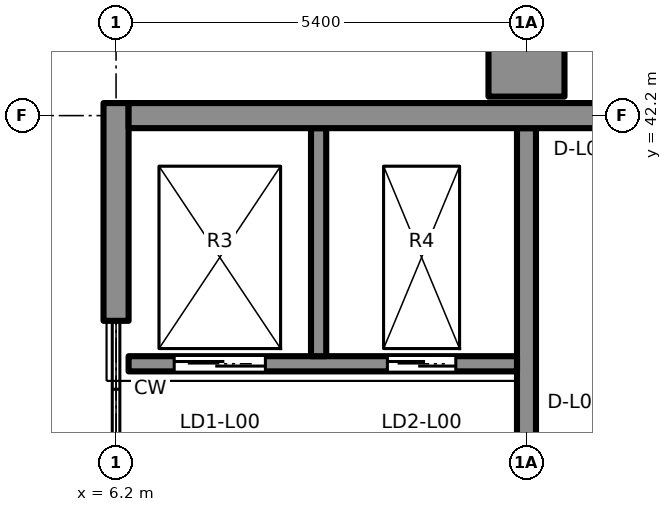
"""IFC4 building model, lengths in metres.
Left out: names, types, materials, properties, quantities, classifications, styles, units other than length and angle.
Written with IfcOpenShell. Run it as: python <this file> out.ifc"""

import sys

from ifc_helpers import new_model, si_unit, direction, frame, frame_2d, origin, place, context, subcontext, project, spatial, rectangle, extrude, element, fill, save


model = new_model("IFC4")
c1 = context("Model", 3, precision=1e-05, world=origin(), true_north=direction((0.0, 1.0)))
c2 = subcontext(c1, "Body", "Model", "MODEL_VIEW")
j1 = project(units=[si_unit("LENGTHUNIT", "METRE"), si_unit("PLANEANGLEUNIT", "RADIAN")], contexts=[c1])
p1 = place(None, origin())
s1 = spatial("IfcSite", under=j1, at=p1, CompositionType="ELEMENT")
p2 = place(p1, origin())
s2 = spatial("IfcBuilding", under=s1, at=p2, CompositionType="ELEMENT")
p3 = place(p2, origin())
s3 = spatial("IfcBuildingStorey", under=s2, at=p3, CompositionType="ELEMENT", Elevation=0.0)
p4 = place(p3, frame((11.6, 35.25, -1.4), z_axis=(0.0, 0.0, 1.0), x_axis=(0.0, 1.0, 0.0)))
e1 = element("IfcWall", 1, at=p4, inside=s3, PredefinedType="SHEAR", context=c2, shape_type="SweptSolid", body=[
    extrude(rectangle(XDim=6.785, YDim=0.25, at=frame_2d((3.393, 0.0))), origin(), (0.0, 0.0, 1.0), 7.45),
])
p5 = place(p4, frame((0.83, 0.0, 1.4)))
e2 = element("IfcOpeningElement", 2, at=p5, cuts=e1, PredefinedType="OPENING", context=c2, shape_type="SweptSolid", body=[
    extrude(rectangle(XDim=1.8, YDim=2.1, at=frame_2d((0.9, 1.05))), frame((0.0, 0.135, 0.0), z_axis=(0.0, -1.0, 0.0), x_axis=(1.0, 0.0, 0.0)), (0.0, 0.0, 1.0), 0.27),
])
p6 = place(p3, frame((6.365, 38.935, -1.4), z_axis=(0.0, 0.0, 1.0), x_axis=(1.0, 0.0, 0.0)))
e3 = element("IfcWall", 3, at=p6, inside=s3, PredefinedType="SHEAR", context=c2, shape_type="SweptSolid", body=[
    extrude(rectangle(XDim=5.11, YDim=0.2, at=frame_2d((2.555, 0.0))), origin(), (0.0, 0.0, 1.0), 7.45),
])
p7 = place(p6, frame((0.6, 0.0, 1.4)))
e4 = element("IfcOpeningElement", 4, at=p7, cuts=e3, PredefinedType="OPENING", context=c2, shape_type="SweptSolid", body=[
    extrude(rectangle(XDim=1.2, YDim=2.1, at=frame_2d((0.6, 1.05))), frame((0.0, 0.11, 0.0), z_axis=(0.0, -1.0, 0.0), x_axis=(1.0, 0.0, 0.0)), (0.0, 0.0, 1.0), 0.22),
])
p8 = place(p6, frame((3.405, 0.0, 1.4)))
e5 = element("IfcOpeningElement", 5, at=p8, cuts=e3, PredefinedType="OPENING", context=c2, shape_type="SweptSolid", body=[
    extrude(rectangle(XDim=0.9, YDim=2.1, at=frame_2d((0.45, 1.05))), frame((0.0, 0.11, 0.0), z_axis=(0.0, -1.0, 0.0), x_axis=(1.0, 0.0, 0.0)), (0.0, 0.0, 1.0), 0.22),
])
p9 = place(p3, frame((8.865, 42.035, -1.4), z_axis=(0.0, 0.0, 1.0), x_axis=(0.0, -1.0, 0.0)))
e6 = element("IfcWall", 6, at=p9, inside=s3, PredefinedType="SHEAR", context=c2, shape_type="SweptSolid", body=[
    extrude(rectangle(XDim=3.0, YDim=0.2, at=frame_2d((1.5, 0.0))), origin(), (0.0, 0.0, 1.0), 7.45),
])
p10 = place(p3, frame((6.365, 42.2, -1.4), z_axis=(0.0, 0.0, 1.0), x_axis=(1.0, 0.0, 0.0)))
e7 = element("IfcWall", 7, at=p10, inside=s3, PredefinedType="SHEAR", context=c2, shape_type="SweptSolid", body=[
    extrude(rectangle(XDim=5.11, YDim=0.25, at=frame_2d((2.555, 0.0))), origin(), (0.0, 0.0, 1.0), 1.4),
])
p11 = place(p3, frame((6.2, 38.835, -1.4), z_axis=(0.0, 0.0, 1.0), x_axis=(0.0, 1.0, 0.0)))
e8 = element("IfcWall", 8, at=p11, inside=s3, PredefinedType="SHEAR", context=c2, shape_type="SweptSolid", body=[
    extrude(rectangle(XDim=3.365, YDim=0.25, at=frame_2d((1.683, 0.0))), origin(), (0.0, 0.0, 1.0), 1.4),
])
p12 = place(p3, frame((6.2, 39.5, 0.0), z_axis=(0.0, 0.0, 1.0), x_axis=(0.0, 1.0, 0.0)))
e9 = element("IfcWall", 9, at=p12, inside=s3, PredefinedType="SOLIDWALL", context=c2, shape_type="SweptSolid", body=[
    extrude(rectangle(XDim=2.865, YDim=0.33, at=frame_2d((1.433, 0.0))), origin(), (0.0, 0.0, 1.0), 5.25),
])
p13 = place(p3, frame((6.365, 42.2, 0.0), z_axis=(0.0, 0.0, 1.0), x_axis=(1.0, 0.0, 0.0)))
e10 = element("IfcWall", 10, at=p13, inside=s3, PredefinedType="SOLIDWALL", context=c2, shape_type="SweptSolid", body=[
    extrude(rectangle(XDim=10.915, YDim=0.33, at=frame_2d((5.458, 0.0))), origin(), (0.0, 0.0, 1.0), 5.5),
])
p14 = place(p13, frame((6.435, 0.0, 0.0)))
e11 = element("IfcOpeningElement", 11, at=p14, cuts=e10, PredefinedType="OPENING", context=c2, shape_type="SweptSolid", body=[
    extrude(rectangle(XDim=1.2, YDim=2.1, at=frame_2d((0.6, 1.05))), frame((0.0, 0.175, 0.0), z_axis=(0.0, -1.0, 0.0), x_axis=(1.0, 0.0, 0.0)), (0.0, 0.0, 1.0), 0.35),
])
p15 = place(p3, frame((11.1, 42.825, 0.0), z_axis=(0.0, 0.0, 1.0), x_axis=(1.0, 0.0, 0.0)))
e12 = element("IfcWall", 12, at=p15, inside=s3, PredefinedType="SOLIDWALL", context=c2, shape_type="SweptSolid", body=[
    extrude(rectangle(XDim=1.0, YDim=0.75, at=frame_2d((0.5, 0.0))), origin(), (0.0, 0.0, 1.0), 6.3),
])
p16 = place(p7, origin())
e13 = element("IfcDoor", 13, at=p16, inside=s3, OperationType="DOUBLE_DOOR_SLIDING", PredefinedType="DOOR", context=c2, shape_type="SweptSolid", body=[
    extrude(rectangle(XDim=1.2, YDim=2.1, at=frame_2d((0.6, 1.05))), frame((0.0, 0.025, 0.0), z_axis=(0.0, -1.0, 0.0), x_axis=(1.0, 0.0, 0.0)), (0.0, 0.0, 1.0), 0.05),
])
fill(e4, e13)
p17 = place(p8, origin())
e14 = element("IfcDoor", 14, at=p17, inside=s3, OperationType="DOUBLE_DOOR_SLIDING", PredefinedType="DOOR", context=c2, shape_type="SweptSolid", body=[
    extrude(rectangle(XDim=0.9, YDim=2.1, at=frame_2d((0.45, 1.05))), frame((0.0, 0.025, 0.0), z_axis=(0.0, -1.0, 0.0), x_axis=(1.0, 0.0, 0.0)), (0.0, 0.0, 1.0), 0.05),
])
fill(e5, e14)
save(model, sys.argv[1])
